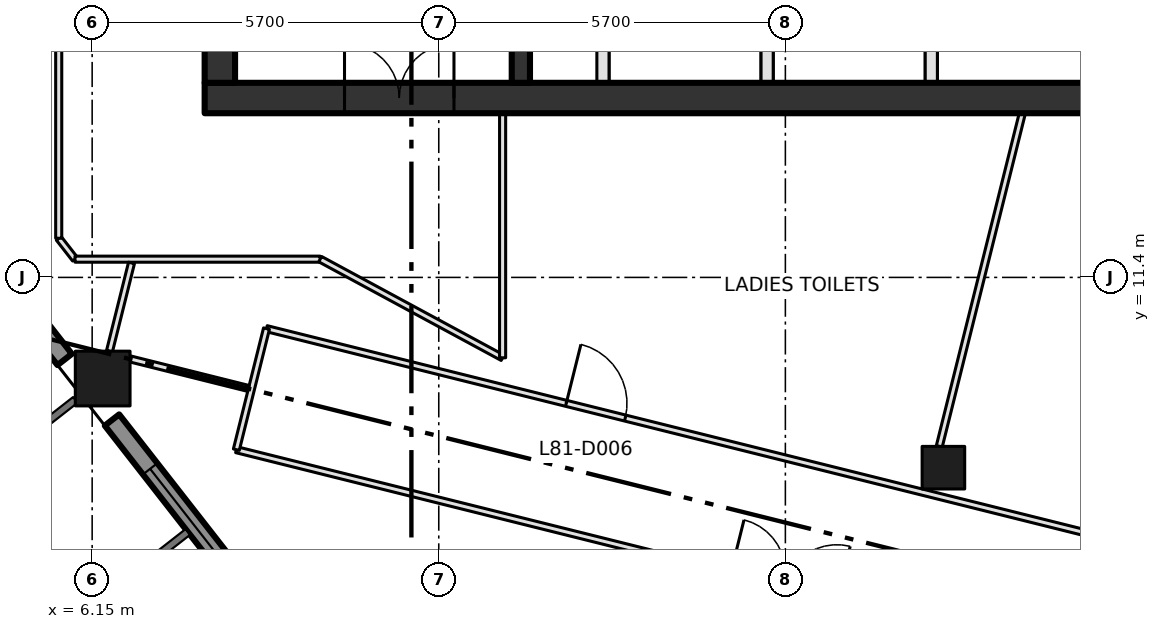
"""IFC4 building model, lengths in metres.
Left out: names, types, materials, properties, quantities, classifications, styles, units other than length and angle.
Written with IfcOpenShell. Run it as: python <this file> out.ifc"""

import sys

from ifc_helpers import new_model, si_unit, direction, frame, frame_2d, origin, origin_2d, place, context, subcontext, project, spatial, rectangle, extrude, element, fill, save


model = new_model("IFC4")
c1 = context("Model", 3, precision=1e-05, world=origin(), true_north=direction((0.0, 1.0)))
c2 = subcontext(c1, "Body", "Model", "MODEL_VIEW")
j1 = project(units=[si_unit("LENGTHUNIT", "METRE"), si_unit("PLANEANGLEUNIT", "RADIAN")], contexts=[c1])
p1 = place(None, origin())
s1 = spatial("IfcSite", under=j1, at=p1, CompositionType="ELEMENT")
p2 = place(p1, origin())
s2 = spatial("IfcBuilding", under=s1, at=p2, CompositionType="ELEMENT")
p3 = place(p2, frame((0.0, 0.0, 354.0)))
s3 = spatial("IfcBuildingStorey", under=s2, at=p3, CompositionType="ELEMENT", Elevation=354.0)
p4 = place(p3, frame((6.323, 9.737, 0.0), z_axis=(0.0, 0.0, 1.0), x_axis=(1.0, 0.0, 0.0)))
e1 = element("IfcColumn", 1, at=p4, inside=s3, PredefinedType="COLUMN", context=c2, shape_type="SweptSolid", body=[
    extrude(rectangle(XDim=0.9, YDim=0.9, at=origin_2d()), origin(), (0.0, 0.0, 1.0), 4.2),
])
p5 = place(p3, frame((20.149, 8.271, 0.0), z_axis=(0.0, 0.0, 1.0), x_axis=(1.0, 0.0, 0.0)))
e2 = element("IfcColumn", 2, at=p5, inside=s3, PredefinedType="COLUMN", context=c2, shape_type="SweptSolid", body=[
    extrude(rectangle(XDim=0.7, YDim=0.7, at=origin_2d()), origin(), (0.0, 0.0, 1.0), 4.2),
])
p6 = place(p3, frame((8.0, 14.35, -0.3), z_axis=(0.0, 0.0, 1.0), x_axis=(1.0, 0.0, 0.0)))
e3 = element("IfcWall", 3, at=p6, inside=s3, PredefinedType="SHEAR", context=c2, shape_type="SweptSolid", body=[
    extrude(rectangle(XDim=22.8, YDim=0.5, at=frame_2d((11.4, 0.0))), origin(), (0.0, 0.0, 1.0), 4.2),
])
p7 = place(p6, frame((2.3, 0.0, 0.3)))
e4 = element("IfcOpeningElement", 4, at=p7, cuts=e3, PredefinedType="OPENING", context=c2, shape_type="SweptSolid", body=[
    extrude(rectangle(XDim=1.8, YDim=2.1, at=frame_2d((0.9, 1.05))), frame((0.0, 0.26, 0.0), z_axis=(0.0, -1.0, 0.0), x_axis=(1.0, 0.0, 0.0)), (0.0, 0.0, 1.0), 0.52),
])
p8 = place(p3, frame((8.25, 14.6, -0.3), z_axis=(0.0, 0.0, 1.0), x_axis=(0.0, 1.0, 0.0)))
e5 = element("IfcWall", 5, at=p8, inside=s3, PredefinedType="SHEAR", context=c2, shape_type="SweptSolid", body=[
    extrude(rectangle(XDim=21.1, YDim=0.5, at=frame_2d((10.55, 0.0))), origin(), (0.0, 0.0, 1.0), 4.2),
])
p9 = place(p3, frame((13.2, 14.6, 0.0), z_axis=(0.0, 0.0, 1.0), x_axis=(0.0, 1.0, 0.0)))
e6 = element("IfcWall", 6, at=p9, inside=s3, PredefinedType="SHEAR", context=c2, shape_type="SweptSolid", body=[
    extrude(rectangle(XDim=21.1, YDim=0.3, at=frame_2d((10.55, 0.0))), origin(), (0.0, 0.0, 1.0), 3.9),
])
p10 = place(p9, frame((3.7, 0.0, 0.0)))
e7 = element("IfcOpeningElement", 7, at=p10, cuts=e6, PredefinedType="OPENING", context=c2, shape_type="SweptSolid", body=[
    extrude(rectangle(XDim=1.8, YDim=2.1, at=frame_2d((0.9, 1.05))), frame((0.0, 0.16, 0.0), z_axis=(0.0, -1.0, 0.0), x_axis=(1.0, 0.0, 0.0)), (0.0, 0.0, 1.0), 0.32),
])
p11 = place(p9, frame((11.8, 0.0, 0.0)))
e8 = element("IfcOpeningElement", 8, at=p11, cuts=e6, PredefinedType="OPENING", context=c2, shape_type="SweptSolid", body=[
    extrude(rectangle(XDim=1.2, YDim=2.1, at=frame_2d((0.6, 1.05))), frame((0.0, 0.16, 0.0), z_axis=(0.0, -1.0, 0.0), x_axis=(1.0, 0.0, 0.0)), (0.0, 0.0, 1.0), 0.32),
])
for number, where, z_axis, x_axis in (
    (9, (14.55, 14.6, 0.0), (0.0, 0.0, 1.0), (0.0, 1.0, 0.0)),
    (10, (17.25, 14.6, 0.0), (0.0, 0.0, 1.0), (0.0, 1.0, 0.0)),
    (11, (19.95, 14.6, 0.0), (0.0, 0.0, 1.0), (0.0, 1.0, 0.0)),
):
    element("IfcWall", number, at=place(p3, frame(where, z_axis=z_axis, x_axis=x_axis)), inside=s3, PredefinedType="SOLIDWALL", context=c2, shape_type="SweptSolid", body=[
        extrude(rectangle(XDim=3.0, YDim=0.2, at=frame_2d((1.5, 0.0))), origin(), (0.0, 0.0, 1.0), 3.9),
    ])
p12 = place(p3, frame((2.967, 13.547, 0.0), z_axis=(0.0, 0.0, 1.0), x_axis=(0.615486001463, -0.788147817356, 0.0)))
e12 = element("IfcWall", 12, at=p12, inside=s3, PredefinedType="SOLIDWALL", context=c2, shape_type="SweptSolid", body=[
    extrude(rectangle(XDim=4.437, YDim=0.3, at=frame_2d((2.219, 0.0))), origin(), (0.0, 0.0, 1.0), 3.2),
])
p13 = place(p12, frame((1.018, 0.0, 0.8)))
e13 = element("IfcOpeningElement", 13, at=p13, cuts=e12, PredefinedType="OPENING", context=c2, shape_type="SweptSolid", body=[
    extrude(rectangle(XDim=2.4, YDim=2.1, at=frame_2d((1.2, 1.05))), frame((0.0, 0.16, 0.0), z_axis=(0.0, -1.0, 0.0), x_axis=(1.0, 0.0, 0.0)), (0.0, 0.0, 1.0), 0.32),
])
p14 = place(p3, frame((6.476, 9.055, 0.0), z_axis=(0.0, 0.0, 1.0), x_axis=(0.615649380255, -0.788020203162, 0.0)))
e14 = element("IfcWall", 14, at=p14, inside=s3, PredefinedType="SOLIDWALL", context=c2, shape_type="SweptSolid", body=[
    extrude(rectangle(XDim=4.438, YDim=0.3, at=frame_2d((2.219, 0.0))), origin(), (0.0, 0.0, 1.0), 3.2),
])
p15 = place(p14, frame((1.019, 0.0, 0.8)))
e15 = element("IfcOpeningElement", 15, at=p15, cuts=e14, PredefinedType="OPENING", context=c2, shape_type="SweptSolid", body=[
    extrude(rectangle(XDim=2.4, YDim=2.1, at=frame_2d((1.2, 1.05))), frame((0.0, 0.16, 0.0), z_axis=(0.0, -1.0, 0.0), x_axis=(1.0, 0.0, 0.0)), (0.0, 0.0, 1.0), 0.32),
])
p16 = place(p3, frame((5.6, 12.044, 0.0), z_axis=(0.0, 0.0, 1.0), x_axis=(0.614328236968, -0.789050579661, 0.0)))
e16 = element("IfcWall", 16, at=p16, inside=s3, PredefinedType="PARTITIONING", context=c2, shape_type="SweptSolid", body=[
    extrude(rectangle(XDim=0.436, YDim=0.1, at=frame_2d((0.218, 0.0))), origin(), (0.0, 0.0, 1.0), 3.9),
])
p17 = place(p3, frame((5.6, 39.3, 0.0), z_axis=(0.0, 0.0, 1.0), x_axis=(0.0, -1.0, 0.0)))
e17 = element("IfcWall", 17, at=p17, inside=s3, PredefinedType="PARTITIONING", context=c2, shape_type="SweptSolid", body=[
    extrude(rectangle(XDim=27.256, YDim=0.1, at=frame_2d((13.628, 0.0))), origin(), (0.0, 0.0, 1.0), 3.9),
])
p18 = place(p17, frame((17.963, 0.0, 0.0)))
e18 = element("IfcOpeningElement", 18, at=p18, cuts=e17, PredefinedType="OPENING", context=c2, shape_type="SweptSolid", body=[
    extrude(rectangle(XDim=1.0, YDim=2.1, at=frame_2d((0.5, 1.05))), frame((0.0, 0.06, 0.0), z_axis=(0.0, -1.0, 0.0), x_axis=(1.0, 0.0, 0.0)), (0.0, 0.0, 1.0), 0.12),
])
p19 = place(p3, frame((5.868, 11.7, 0.0), z_axis=(0.0, 0.0, 1.0), x_axis=(1.0, 0.0, 0.0)))
e19 = element("IfcWall", 19, at=p19, inside=s3, PredefinedType="PARTITIONING", context=c2, shape_type="SweptSolid", body=[
    extrude(rectangle(XDim=4.032, YDim=0.1, at=frame_2d((2.016, 0.0))), origin(), (0.0, 0.0, 1.0), 3.9),
])
p20 = place(p3, frame((8.521, 8.567, 0.0), z_axis=(0.0, 0.0, 1.0), x_axis=(0.970303035129, -0.241892579506, 0.0)))
e20 = element("IfcWall", 20, at=p20, inside=s3, PredefinedType="PARTITIONING", context=c2, shape_type="SweptSolid", body=[
    extrude(rectangle(XDim=28.5, YDim=0.1, at=frame_2d((14.25, 0.0))), origin(), (0.0, 0.0, 1.0), 3.9),
])
p21 = place(p20, frame((13.98, 0.0, 0.0)))
e21 = element("IfcOpeningElement", 21, at=p21, cuts=e20, PredefinedType="OPENING", context=c2, shape_type="SweptSolid", body=[
    extrude(rectangle(XDim=1.0, YDim=2.1, at=frame_2d((0.5, 1.05))), frame((0.0, 0.06, 0.0), z_axis=(0.0, -1.0, 0.0), x_axis=(1.0, 0.0, 0.0)), (0.0, 0.0, 1.0), 0.12),
])
p22 = place(p20, frame((8.38, 0.0, 0.0)))
e22 = element("IfcOpeningElement", 22, at=p22, cuts=e20, PredefinedType="OPENING", context=c2, shape_type="SweptSolid", body=[
    extrude(rectangle(XDim=1.8, YDim=2.1, at=frame_2d((0.9, 1.05))), frame((0.0, 0.06, 0.0), z_axis=(0.0, -1.0, 0.0), x_axis=(1.0, 0.0, 0.0)), (0.0, 0.0, 1.0), 0.12),
])
p23 = place(p3, frame((9.017, 10.558, 0.0), z_axis=(0.0, 0.0, 1.0), x_axis=(0.970286089829, -0.241960542, 0.0)))
e23 = element("IfcWall", 23, at=p23, inside=s3, PredefinedType="PARTITIONING", context=c2, shape_type="SweptSolid", body=[
    extrude(rectangle(XDim=19.879, YDim=0.1, at=frame_2d((9.94, 0.0))), origin(), (0.0, 0.0, 1.0), 3.9),
])
p24 = place(p23, frame((5.08, 0.0, 0.0)))
e24 = element("IfcOpeningElement", 24, at=p24, cuts=e23, PredefinedType="OPENING", context=c2, shape_type="SweptSolid", body=[
    extrude(rectangle(XDim=1.0, YDim=2.1, at=frame_2d((0.5, 1.05))), frame((0.0, 0.06, 0.0), z_axis=(0.0, -1.0, 0.0), x_axis=(1.0, 0.0, 0.0)), (0.0, 0.0, 1.0), 0.12),
])
p25 = place(p23, frame((15.184, 0.0, 0.0)))
e25 = element("IfcOpeningElement", 25, at=p25, cuts=e23, PredefinedType="OPENING", context=c2, shape_type="SweptSolid", body=[
    extrude(rectangle(XDim=1.0, YDim=2.1, at=frame_2d((0.5, 1.05))), frame((0.0, 0.06, 0.0), z_axis=(0.0, -1.0, 0.0), x_axis=(1.0, 0.0, 0.0)), (0.0, 0.0, 1.0), 0.12),
])
p26 = place(p3, frame((9.017, 10.558, 0.0), z_axis=(0.0, 0.0, 1.0), x_axis=(-0.241751728323, -0.970338137895, 0.0)))
e26 = element("IfcWall", 26, at=p26, inside=s3, PredefinedType="PARTITIONING", context=c2, shape_type="SweptSolid", body=[
    extrude(rectangle(XDim=2.052, YDim=0.1, at=frame_2d((1.026, 0.0))), origin(), (0.0, 0.0, 1.0), 3.9),
])
p27 = place(p3, frame((9.9, 11.7, 0.0), z_axis=(0.0, 0.0, 1.0), x_axis=(0.87965147249, -0.475618846291, 0.0)))
e27 = element("IfcWall", 27, at=p27, inside=s3, PredefinedType="PARTITIONING", context=c2, shape_type="SweptSolid", body=[
    extrude(rectangle(XDim=3.41, YDim=0.1, at=frame_2d((1.705, 0.0))), origin(), (0.0, 0.0, 1.0), 3.9),
])
p28 = place(p3, frame((12.9, 10.078, 0.0), z_axis=(0.0, 0.0, 1.0), x_axis=(0.0, 1.0, 0.0)))
e28 = element("IfcWall", 28, at=p28, inside=s3, PredefinedType="PARTITIONING", context=c2, shape_type="SweptSolid", body=[
    extrude(rectangle(XDim=4.022, YDim=0.1, at=frame_2d((2.011, 0.0))), origin(), (0.0, 0.0, 1.0), 3.9),
])
p29 = place(p3, frame((6.797, 11.638, 0.0), z_axis=(0.0, 0.0, 1.0), x_axis=(-0.242113049408, -0.970248046278, 0.0)))
e29 = element("IfcWall", 29, at=p29, inside=s3, PredefinedType="PARTITIONING", context=c2, shape_type="SweptSolid", body=[
    extrude(rectangle(XDim=1.495, YDim=0.1, at=frame_2d((0.748, 0.0))), origin(), (0.0, 0.0, 1.0), 3.9),
])
p30 = place(p3, frame((8.72, 9.574, 0.0), z_axis=(0.0, 0.0, 1.0), x_axis=(-0.970221168815, 0.24222073318, 0.0)))
e30 = element("IfcWall", 30, at=p30, inside=s3, PredefinedType="PARTITIONING", context=c2, shape_type="SweptSolid", body=[
    extrude(rectangle(XDim=2.007, YDim=0.1, at=frame_2d((1.003, 0.0))), origin(), (0.0, 0.0, 1.0), 3.9),
])
p31 = place(p3, frame((20.081, 8.621, 0.0), z_axis=(0.0, 0.0, 1.0), x_axis=(0.241904838353, 0.970299978966, 0.0)))
e31 = element("IfcWall", 31, at=p31, inside=s3, PredefinedType="PARTITIONING", context=c2, shape_type="SweptSolid", body=[
    extrude(rectangle(XDim=5.647, YDim=0.1, at=frame_2d((2.823, 0.0))), origin(), (0.0, 0.0, 1.0), 3.9),
])
p32 = place(p7, origin())
e32 = element("IfcDoor", 32, at=p32, inside=s3, OperationType="DOUBLE_DOOR_SINGLE_SWING", PredefinedType="DOOR", context=c2, shape_type="SweptSolid", body=[
    extrude(rectangle(XDim=1.8, YDim=2.1, at=frame_2d((0.9, 1.05))), frame((0.0, 0.025, 0.0), z_axis=(0.0, -1.0, 0.0), x_axis=(1.0, 0.0, 0.0)), (0.0, 0.0, 1.0), 0.05),
])
fill(e4, e32)
p33 = place(p15, origin())
e33 = element("IfcWindow", 33, at=p33, inside=s3, PartitioningType="DOUBLE_PANEL_VERTICAL", PredefinedType="WINDOW", context=c2, shape_type="SweptSolid", body=[
    extrude(rectangle(XDim=2.4, YDim=2.1, at=frame_2d((1.2, 1.05))), frame((0.0, 0.03, 0.0), z_axis=(0.0, -1.0, 0.0), x_axis=(1.0, 0.0, 0.0)), (0.0, 0.0, 1.0), 0.06),
])
fill(e15, e33)
p34 = place(p24, origin())
e34 = element("IfcDoor", 34, at=p34, inside=s3, OperationType="SINGLE_SWING_LEFT", PredefinedType="DOOR", context=c2, shape_type="SweptSolid", body=[
    extrude(rectangle(XDim=1.0, YDim=2.1, at=frame_2d((0.5, 1.05))), frame((0.0, 0.025, 0.0), z_axis=(0.0, -1.0, 0.0), x_axis=(1.0, 0.0, 0.0)), (0.0, 0.0, 1.0), 0.05),
])
fill(e24, e34)
save(model, sys.argv[1])
